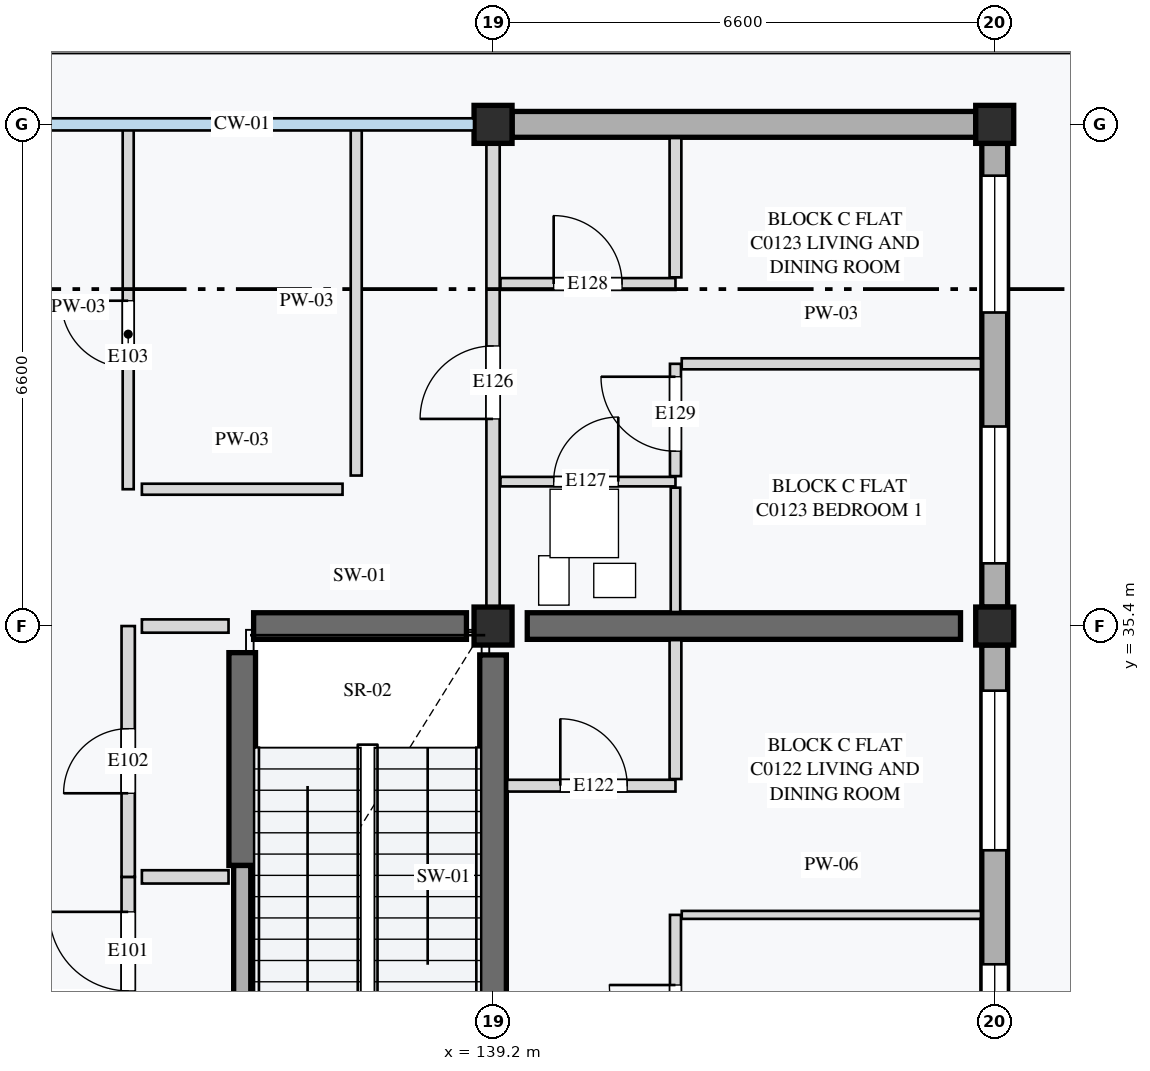
"""IFC4 building model, lengths in metres.
Left out: names, types, materials, properties, quantities, classifications, styles, units other than length and angle.
Written with IfcOpenShell. Run it as: python <this file> out.ifc"""

import sys

from ifc_helpers import new_model, si_unit, direction, frame, frame_2d, origin, origin_2d, place, context, subcontext, project, spatial, rectangle, extrude, element, fill, save


model = new_model("IFC4")
c1 = context("Model", 3, precision=1e-05, world=origin(), true_north=direction((0.0, 1.0)))
c2 = subcontext(c1, "Body", "Model", "MODEL_VIEW")
j1 = project(units=[si_unit("LENGTHUNIT", "METRE"), si_unit("PLANEANGLEUNIT", "RADIAN")], contexts=[c1])
p1 = place(None, origin())
s1 = spatial("IfcSite", under=j1, at=p1, CompositionType="ELEMENT")
p2 = place(p1, origin())
s2 = spatial("IfcBuilding", under=s1, at=p2, CompositionType="ELEMENT")
p3 = place(p2, frame((0.0, 0.0, 4.2)))
s3 = spatial("IfcBuildingStorey", under=s2, at=p3, CompositionType="ELEMENT", Elevation=4.2)
for number, where, z_axis, x_axis in (
    (1, (139.2, 35.4, 0.0), (0.0, 0.0, 1.0), (1.0, 0.0, 0.0)),
    (2, (145.8, 35.4, 0.0), (0.0, 0.0, 1.0), (1.0, 0.0, 0.0)),
    (3, (139.2, 42.0, 0.0), (0.0, 0.0, 1.0), (1.0, 0.0, 0.0)),
    (4, (145.8, 42.0, 0.0), (0.0, 0.0, 1.0), (1.0, 0.0, 0.0)),
):
    element("IfcColumn", number, at=place(p3, frame(where, z_axis=z_axis, x_axis=x_axis)), inside=s3, PredefinedType="COLUMN", context=c2, shape_type="SweptSolid", body=[
        extrude(rectangle(XDim=0.5, YDim=0.5, at=origin_2d()), origin(), (0.0, 0.0, 1.0), 4.2),
    ])
p4 = place(p3, frame((139.2, 29.18, 0.0), z_axis=(0.0, 0.0, 1.0), x_axis=(0.0, 1.0, 0.0)))
e5 = element("IfcWall", 5, at=p4, inside=s3, PredefinedType="SHEAR", context=c2, shape_type="SweptSolid", body=[
    extrude(rectangle(XDim=5.84, YDim=0.35, at=frame_2d((2.92, 0.0))), origin(), (0.0, 0.0, 1.0), 3.96),
])
for number, where, z_axis, x_axis in (
    (6, (135.9, 32.25, 0.0), (0.0, 0.0, 1.0), (0.0, 1.0, 0.0)),
    (7, (136.05, 35.4, 0.0), (0.0, 0.0, 1.0), (1.0, 0.0, 0.0)),
):
    element("IfcWall", number, at=place(p3, frame(where, z_axis=z_axis, x_axis=x_axis)), inside=s3, PredefinedType="SHEAR", context=c2, shape_type="SweptSolid", body=[
        extrude(rectangle(XDim=2.8, YDim=0.35, at=frame_2d((1.4, 0.0))), origin(), (0.0, 0.0, 1.0), 3.96),
    ])
p5 = place(p3, frame((139.65, 35.4, 0.0), z_axis=(0.0, 0.0, 1.0), x_axis=(1.0, 0.0, 0.0)))
e8 = element("IfcWall", 8, at=p5, inside=s3, PredefinedType="SHEAR", context=c2, shape_type="SweptSolid", body=[
    extrude(rectangle(XDim=5.7, YDim=0.35, at=frame_2d((2.85, 0.0))), origin(), (0.0, 0.0, 1.0), 3.96),
])
p6 = place(p3, frame((145.8, 29.05, 0.0), z_axis=(0.0, 0.0, 1.0), x_axis=(0.0, 1.0, 0.0)))
e9 = element("IfcWall", 9, at=p6, inside=s3, PredefinedType="STANDARD", context=c2, shape_type="SweptSolid", body=[
    extrude(rectangle(XDim=6.1, YDim=0.34, at=frame_2d((3.05, 0.0))), origin(), (0.0, 0.0, 1.0), 3.6),
])
p7 = place(p6, frame((0.7, 0.0, 0.85)))
e10 = element("IfcOpeningElement", 10, at=p7, cuts=e9, PredefinedType="OPENING", context=c2, shape_type="SweptSolid", body=[
    extrude(rectangle(XDim=1.2, YDim=1.35, at=frame_2d((0.6, 0.675))), frame((0.0, 0.18, 0.0), z_axis=(0.0, -1.0, 0.0), x_axis=(1.0, 0.0, 0.0)), (0.0, 0.0, 1.0), 0.36),
])
p8 = place(p6, frame((3.4, 0.0, 0.85)))
e11 = element("IfcOpeningElement", 11, at=p8, cuts=e9, PredefinedType="OPENING", context=c2, shape_type="SweptSolid", body=[
    extrude(rectangle(XDim=2.1, YDim=1.55, at=frame_2d((1.05, 0.775))), frame((0.0, 0.18, 0.0), z_axis=(0.0, -1.0, 0.0), x_axis=(1.0, 0.0, 0.0)), (0.0, 0.0, 1.0), 0.36),
])
p9 = place(p3, frame((145.8, 35.65, 0.0), z_axis=(0.0, 0.0, 1.0), x_axis=(0.0, 1.0, 0.0)))
e12 = element("IfcWall", 12, at=p9, inside=s3, PredefinedType="STANDARD", context=c2, shape_type="SweptSolid", body=[
    extrude(rectangle(XDim=6.1, YDim=0.34, at=frame_2d((3.05, 0.0))), origin(), (0.0, 0.0, 1.0), 3.6),
])
p10 = place(p9, frame((0.575, 0.0, 0.85)))
e13 = element("IfcOpeningElement", 13, at=p10, cuts=e12, PredefinedType="OPENING", context=c2, shape_type="SweptSolid", body=[
    extrude(rectangle(XDim=1.8, YDim=1.35, at=frame_2d((0.9, 0.675))), frame((0.0, 0.18, 0.0), z_axis=(0.0, -1.0, 0.0), x_axis=(1.0, 0.0, 0.0)), (0.0, 0.0, 1.0), 0.36),
])
p11 = place(p9, frame((3.875, 0.0, 0.85)))
e14 = element("IfcOpeningElement", 14, at=p11, cuts=e12, PredefinedType="OPENING", context=c2, shape_type="SweptSolid", body=[
    extrude(rectangle(XDim=1.8, YDim=1.55, at=frame_2d((0.9, 0.775))), frame((0.0, 0.18, 0.0), z_axis=(0.0, -1.0, 0.0), x_axis=(1.0, 0.0, 0.0)), (0.0, 0.0, 1.0), 0.36),
])
p12 = place(p3, frame((139.45, 42.0, 0.0), z_axis=(0.0, 0.0, 1.0), x_axis=(1.0, 0.0, 0.0)))
e15 = element("IfcWall", 15, at=p12, inside=s3, PredefinedType="STANDARD", context=c2, shape_type="SweptSolid", body=[
    extrude(rectangle(XDim=6.1, YDim=0.34, at=frame_2d((3.05, 0.0))), origin(), (0.0, 0.0, 1.0), 3.65),
])
p13 = place(p3, frame((135.9, 28.8, 0.0), z_axis=(0.0, 0.0, 1.0), x_axis=(0.0, 1.0, 0.0)))
e16 = element("IfcWall", 16, at=p13, inside=s3, PredefinedType="STANDARD", context=c2, shape_type="SweptSolid", body=[
    extrude(rectangle(XDim=3.45, YDim=0.225, at=frame_2d((1.725, 0.0))), origin(), (0.0, 0.0, 1.0), 3.96),
])
p14 = place(p13, frame((0.45, 0.0, 0.0)))
e17 = element("IfcOpeningElement", 17, at=p14, cuts=e16, PredefinedType="OPENING", context=c2, shape_type="SweptSolid", body=[
    extrude(rectangle(XDim=1.0, YDim=2.16, at=frame_2d((0.5, 1.08))), frame((0.0, 0.123, 0.0), z_axis=(0.0, -1.0, 0.0), x_axis=(1.0, 0.0, 0.0)), (0.0, 0.0, 1.0), 0.245),
])
p15 = place(p3, frame((134.4, 28.8, 0.0), z_axis=(0.0, 0.0, 1.0), x_axis=(0.0, 1.0, 0.0)))
e18 = element("IfcWall", 18, at=p15, inside=s3, PredefinedType="PARTITIONING", context=c2, shape_type="SweptSolid", body=[
    extrude(rectangle(XDim=3.3, YDim=0.175, at=frame_2d((1.65, 0.0))), origin(), (0.0, 0.0, 1.0), 3.96),
])
p16 = place(p15, frame((1.8, 0.0, 0.0)))
e19 = element("IfcOpeningElement", 19, at=p16, cuts=e18, PredefinedType="OPENING", context=c2, shape_type="SweptSolid", body=[
    extrude(rectangle(XDim=1.04, YDim=2.12, at=frame_2d((0.52, 1.06))), frame((0.0, 0.097, 0.0), z_axis=(0.0, -1.0, 0.0), x_axis=(1.0, 0.0, 0.0)), (0.0, 0.0, 1.0), 0.195),
])
p17 = place(p3, frame((134.4, 32.1, 0.0), z_axis=(0.0, 0.0, 1.0), x_axis=(0.0, 1.0, 0.0)))
e20 = element("IfcWall", 20, at=p17, inside=s3, PredefinedType="PARTITIONING", context=c2, shape_type="SweptSolid", body=[
    extrude(rectangle(XDim=3.3, YDim=0.175, at=frame_2d((1.65, 0.0))), origin(), (0.0, 0.0, 1.0), 3.96),
])
p18 = place(p17, frame((1.1, 0.0, 0.0)))
e21 = element("IfcOpeningElement", 21, at=p18, cuts=e20, PredefinedType="OPENING", context=c2, shape_type="SweptSolid", body=[
    extrude(rectangle(XDim=0.85, YDim=2.0, at=frame_2d((0.425, 1.0))), frame((0.0, 0.097, 0.0), z_axis=(0.0, -1.0, 0.0), x_axis=(1.0, 0.0, 0.0)), (0.0, 0.0, 1.0), 0.195),
])
for number, where, z_axis, x_axis in (
    (22, (134.58, 32.1, 0.0), (0.0, 0.0, 1.0), (1.0, 0.0, 0.0)),
    (23, (134.58, 35.4, 0.0), (0.0, 0.0, 1.0), (1.0, 0.0, 0.0)),
):
    element("IfcWall", number, at=place(p3, frame(where, z_axis=z_axis, x_axis=x_axis)), inside=s3, PredefinedType="PARTITIONING", context=c2, shape_type="SweptSolid", body=[
        extrude(rectangle(XDim=1.14, YDim=0.175, at=frame_2d((0.57, 0.0))), origin(), (0.0, 0.0, 1.0), 3.96),
    ])
p19 = place(p3, frame((134.4, 37.2, 0.0), z_axis=(0.0, 0.0, 1.0), x_axis=(0.0, 1.0, 0.0)))
e24 = element("IfcWall", 24, at=p19, inside=s3, PredefinedType="PARTITIONING", context=c2, shape_type="SweptSolid", body=[
    extrude(rectangle(XDim=4.8, YDim=0.145, at=frame_2d((2.4, 0.0))), origin(), (0.0, 0.0, 1.0), 3.96),
])
p20 = place(p19, frame((1.6, 0.0, 0.0)))
e25 = element("IfcOpeningElement", 25, at=p20, cuts=e24, PredefinedType="OPENING", context=c2, shape_type="SweptSolid", body=[
    extrude(rectangle(XDim=0.88, YDim=2.1, at=frame_2d((0.44, 1.05))), frame((0.0, 0.083, 0.0), z_axis=(0.0, -1.0, 0.0), x_axis=(1.0, 0.0, 0.0)), (0.0, 0.0, 1.0), 0.165),
])
p21 = place(p3, frame((137.4, 37.38, 0.0), z_axis=(0.0, 0.0, 1.0), x_axis=(0.0, 1.0, 0.0)))
e26 = element("IfcWall", 26, at=p21, inside=s3, PredefinedType="PARTITIONING", context=c2, shape_type="SweptSolid", body=[
    extrude(rectangle(XDim=4.6, YDim=0.145, at=frame_2d((2.3, 0.0))), origin(), (0.0, 0.0, 1.0), 3.96),
])
p22 = place(p3, frame((134.58, 37.2, 0.0), z_axis=(0.0, 0.0, 1.0), x_axis=(1.0, 0.0, 0.0)))
e27 = element("IfcWall", 27, at=p22, inside=s3, PredefinedType="PARTITIONING", context=c2, shape_type="SweptSolid", body=[
    extrude(rectangle(XDim=2.64, YDim=0.145, at=frame_2d((1.32, 0.0))), origin(), (0.0, 0.0, 1.0), 3.96),
])
p23 = place(p3, frame((139.385, 33.3, 0.0), z_axis=(0.0, 0.0, 1.0), x_axis=(1.0, 0.0, 0.0)))
e28 = element("IfcWall", 28, at=p23, inside=s3, PredefinedType="PARTITIONING", context=c2, shape_type="SweptSolid", body=[
    extrude(rectangle(XDim=2.215, YDim=0.155, at=frame_2d((1.107, 0.0))), origin(), (0.0, 0.0, 1.0), 3.96),
])
p24 = place(p23, frame((0.7, 0.0, 0.0)))
e29 = element("IfcOpeningElement", 29, at=p24, cuts=e28, PredefinedType="OPENING", context=c2, shape_type="SweptSolid", body=[
    extrude(rectangle(XDim=0.88, YDim=2.16, at=frame_2d((0.44, 1.08))), frame((0.0, 0.087, 0.0), z_axis=(0.0, -1.0, 0.0), x_axis=(1.0, 0.0, 0.0)), (0.0, 0.0, 1.0), 0.175),
])
p25 = place(p3, frame((141.6, 33.387, 0.0), z_axis=(0.0, 0.0, 1.0), x_axis=(0.0, 1.0, 0.0)))
e30 = element("IfcWall", 30, at=p25, inside=s3, PredefinedType="PARTITIONING", context=c2, shape_type="SweptSolid", body=[
    extrude(rectangle(XDim=1.828, YDim=0.155, at=frame_2d((0.914, 0.0))), origin(), (0.0, 0.0, 1.0), 3.96),
])
p26 = place(p3, frame((141.6, 28.782, 0.0), z_axis=(0.0, 0.0, 1.0), x_axis=(0.0, 1.0, 0.0)))
e31 = element("IfcWall", 31, at=p26, inside=s3, PredefinedType="PARTITIONING", context=c2, shape_type="SweptSolid", body=[
    extrude(rectangle(XDim=2.818, YDim=0.145, at=frame_2d((1.409, 0.0))), origin(), (0.0, 0.0, 1.0), 3.96),
])
p27 = place(p26, frame((1.025, 0.0, 0.0)))
e32 = element("IfcOpeningElement", 32, at=p27, cuts=e31, PredefinedType="OPENING", context=c2, shape_type="SweptSolid", body=[
    extrude(rectangle(XDim=0.87, YDim=2.08, at=frame_2d((0.435, 1.04))), frame((0.0, 0.083, 0.0), z_axis=(0.0, -1.0, 0.0), x_axis=(1.0, 0.0, 0.0)), (0.0, 0.0, 1.0), 0.165),
])
p28 = place(p3, frame((141.683, 31.6, 0.0), z_axis=(0.0, 0.0, 1.0), x_axis=(1.0, 0.0, 0.0)))
e33 = element("IfcWall", 33, at=p28, inside=s3, PredefinedType="PARTITIONING", context=c2, shape_type="SweptSolid", body=[
    extrude(rectangle(XDim=3.938, YDim=0.105, at=frame_2d((1.969, 0.0))), origin(), (0.0, 0.0, 1.0), 3.96),
])
p29 = place(p3, frame((139.2, 35.4, 0.0), z_axis=(0.0, 0.0, 1.0), x_axis=(0.0, 1.0, 0.0)))
e34 = element("IfcWall", 34, at=p29, inside=s3, PredefinedType="PARTITIONING", context=c2, shape_type="SweptSolid", body=[
    extrude(rectangle(XDim=6.6, YDim=0.175, at=frame_2d((3.3, 0.0))), origin(), (0.0, 0.0, 1.0), 3.7),
])
p30 = place(p29, frame((2.725, 0.0, 0.0)))
e35 = element("IfcOpeningElement", 35, at=p30, cuts=e34, PredefinedType="OPENING", context=c2, shape_type="SweptSolid", body=[
    extrude(rectangle(XDim=0.96, YDim=2.18, at=frame_2d((0.48, 1.09))), frame((0.0, 0.097, 0.0), z_axis=(0.0, -1.0, 0.0), x_axis=(1.0, 0.0, 0.0)), (0.0, 0.0, 1.0), 0.195),
])
p31 = place(p3, frame((139.298, 37.3, 0.0), z_axis=(0.0, 0.0, 1.0), x_axis=(1.0, 0.0, 0.0)))
e36 = element("IfcWall", 36, at=p31, inside=s3, PredefinedType="PARTITIONING", context=c2, shape_type="SweptSolid", body=[
    extrude(rectangle(XDim=2.302, YDim=0.125, at=frame_2d((1.151, 0.0))), origin(), (0.0, 0.0, 1.0), 3.96),
])
p32 = place(p31, frame((0.7, 0.0, 0.0)))
e37 = element("IfcOpeningElement", 37, at=p32, cuts=e36, PredefinedType="OPENING", context=c2, shape_type="SweptSolid", body=[
    extrude(rectangle(XDim=0.85, YDim=2.04, at=frame_2d((0.425, 1.02))), frame((0.0, 0.073, 0.0), z_axis=(0.0, -1.0, 0.0), x_axis=(1.0, 0.0, 0.0)), (0.0, 0.0, 1.0), 0.145),
])
p33 = place(p3, frame((141.6, 35.585, 0.0), z_axis=(0.0, 0.0, 1.0), x_axis=(0.0, 1.0, 0.0)))
e38 = element("IfcWall", 38, at=p33, inside=s3, PredefinedType="PARTITIONING", context=c2, shape_type="SweptSolid", body=[
    extrude(rectangle(XDim=1.635, YDim=0.125, at=frame_2d((0.817, 0.0))), origin(), (0.0, 0.0, 1.0), 3.96),
])
p34 = place(p3, frame((139.298, 39.9, 0.0), z_axis=(0.0, 0.0, 1.0), x_axis=(1.0, 0.0, 0.0)))
e39 = element("IfcWall", 39, at=p34, inside=s3, PredefinedType="PARTITIONING", context=c2, shape_type="SweptSolid", body=[
    extrude(rectangle(XDim=2.302, YDim=0.155, at=frame_2d((1.151, 0.0))), origin(), (0.0, 0.0, 1.0), 3.96),
])
p35 = place(p34, frame((0.7, 0.0, 0.0)))
e40 = element("IfcOpeningElement", 40, at=p35, cuts=e39, PredefinedType="OPENING", context=c2, shape_type="SweptSolid", body=[
    extrude(rectangle(XDim=0.9, YDim=2.16, at=frame_2d((0.45, 1.08))), frame((0.0, 0.087, 0.0), z_axis=(0.0, -1.0, 0.0), x_axis=(1.0, 0.0, 0.0)), (0.0, 0.0, 1.0), 0.175),
])
p36 = place(p3, frame((141.6, 39.988, 0.0), z_axis=(0.0, 0.0, 1.0), x_axis=(0.0, 1.0, 0.0)))
e41 = element("IfcWall", 41, at=p36, inside=s3, PredefinedType="PARTITIONING", context=c2, shape_type="SweptSolid", body=[
    extrude(rectangle(XDim=1.833, YDim=0.155, at=frame_2d((0.916, 0.0))), origin(), (0.0, 0.0, 1.0), 3.96),
])
p37 = place(p3, frame((141.6, 37.373, 0.0), z_axis=(0.0, 0.0, 1.0), x_axis=(0.0, 1.0, 0.0)))
e42 = element("IfcWall", 42, at=p37, inside=s3, PredefinedType="PARTITIONING", context=c2, shape_type="SweptSolid", body=[
    extrude(rectangle(XDim=1.478, YDim=0.145, at=frame_2d((0.739, 0.0))), origin(), (0.0, 0.0, 1.0), 3.96),
])
p38 = place(p37, frame((0.327, 0.0, 0.0)))
e43 = element("IfcOpeningElement", 43, at=p38, cuts=e42, PredefinedType="OPENING", context=c2, shape_type="SweptSolid", body=[
    extrude(rectangle(XDim=0.98, YDim=2.12, at=frame_2d((0.49, 1.06))), frame((0.0, 0.083, 0.0), z_axis=(0.0, -1.0, 0.0), x_axis=(1.0, 0.0, 0.0)), (0.0, 0.0, 1.0), 0.165),
])
p39 = place(p3, frame((141.683, 38.85, 0.0), z_axis=(0.0, 0.0, 1.0), x_axis=(1.0, 0.0, 0.0)))
e44 = element("IfcWall", 44, at=p39, inside=s3, PredefinedType="PARTITIONING", context=c2, shape_type="SweptSolid", body=[
    extrude(rectangle(XDim=3.938, YDim=0.145, at=frame_2d((1.969, 0.0))), origin(), (0.0, 0.0, 1.0), 3.96),
])
p40 = place(p7, origin())
e45 = element("IfcWindow", 45, at=p40, inside=s3, PartitioningType="SINGLE_PANEL", PredefinedType="WINDOW", context=c2, shape_type="SweptSolid", body=[
    extrude(rectangle(XDim=1.2, YDim=1.35, at=frame_2d((0.6, 0.675))), frame((0.0, 0.03, 0.0), z_axis=(0.0, -1.0, 0.0), x_axis=(1.0, 0.0, 0.0)), (0.0, 0.0, 1.0), 0.06),
])
fill(e10, e45)
p41 = place(p8, origin())
e46 = element("IfcWindow", 46, at=p41, inside=s3, PartitioningType="SINGLE_PANEL", PredefinedType="WINDOW", context=c2, shape_type="SweptSolid", body=[
    extrude(rectangle(XDim=2.1, YDim=1.55, at=frame_2d((1.05, 0.775))), frame((0.0, 0.03, 0.0), z_axis=(0.0, -1.0, 0.0), x_axis=(1.0, 0.0, 0.0)), (0.0, 0.0, 1.0), 0.06),
])
fill(e11, e46)
p42 = place(p10, origin())
e47 = element("IfcWindow", 47, at=p42, inside=s3, PartitioningType="SINGLE_PANEL", PredefinedType="WINDOW", context=c2, shape_type="SweptSolid", body=[
    extrude(rectangle(XDim=1.8, YDim=1.35, at=frame_2d((0.9, 0.675))), frame((0.0, 0.03, 0.0), z_axis=(0.0, -1.0, 0.0), x_axis=(1.0, 0.0, 0.0)), (0.0, 0.0, 1.0), 0.06),
])
fill(e13, e47)
p43 = place(p11, origin())
e48 = element("IfcWindow", 48, at=p43, inside=s3, PartitioningType="SINGLE_PANEL", PredefinedType="WINDOW", context=c2, shape_type="SweptSolid", body=[
    extrude(rectangle(XDim=1.8, YDim=1.55, at=frame_2d((0.9, 0.775))), frame((0.0, 0.03, 0.0), z_axis=(0.0, -1.0, 0.0), x_axis=(1.0, 0.0, 0.0)), (0.0, 0.0, 1.0), 0.06),
])
fill(e14, e48)
p44 = place(p16, origin())
e49 = element("IfcDoor", 49, at=p44, inside=s3, OperationType="SINGLE_SWING_RIGHT", PredefinedType="DOOR", context=c2, shape_type="SweptSolid", body=[
    extrude(rectangle(XDim=1.04, YDim=2.12, at=frame_2d((0.52, 1.06))), frame((0.0, 0.025, 0.0), z_axis=(0.0, -1.0, 0.0), x_axis=(1.0, 0.0, 0.0)), (0.0, 0.0, 1.0), 0.05),
])
fill(e19, e49)
p45 = place(p18, origin())
e50 = element("IfcDoor", 50, at=p45, inside=s3, OperationType="SINGLE_SWING_LEFT", PredefinedType="DOOR", context=c2, shape_type="SweptSolid", body=[
    extrude(rectangle(XDim=0.85, YDim=2.0, at=frame_2d((0.425, 1.0))), frame((0.0, 0.025, 0.0), z_axis=(0.0, -1.0, 0.0), x_axis=(1.0, 0.0, 0.0)), (0.0, 0.0, 1.0), 0.05),
])
fill(e21, e50)
p46 = place(p20, origin())
e51 = element("IfcDoor", 51, at=p46, inside=s3, OperationType="SINGLE_SWING_RIGHT", PredefinedType="DOOR", context=c2, shape_type="SweptSolid", body=[
    extrude(rectangle(XDim=0.88, YDim=2.1, at=frame_2d((0.44, 1.05))), frame((0.0, 0.025, 0.0), z_axis=(0.0, -1.0, 0.0), x_axis=(1.0, 0.0, 0.0)), (0.0, 0.0, 1.0), 0.05),
])
fill(e25, e51)
p47 = place(p24, origin())
e52 = element("IfcDoor", 52, at=p47, inside=s3, OperationType="SINGLE_SWING_LEFT", PredefinedType="DOOR", context=c2, shape_type="SweptSolid", body=[
    extrude(rectangle(XDim=0.88, YDim=2.16, at=frame_2d((0.44, 1.08))), frame((0.0, 0.025, 0.0), z_axis=(0.0, -1.0, 0.0), x_axis=(1.0, 0.0, 0.0)), (0.0, 0.0, 1.0), 0.05),
])
fill(e29, e52)
p48 = place(p27, origin())
e53 = element("IfcDoor", 53, at=p48, inside=s3, OperationType="SINGLE_SWING_RIGHT", PredefinedType="DOOR", context=c2, shape_type="SweptSolid", body=[
    extrude(rectangle(XDim=0.87, YDim=2.08, at=frame_2d((0.435, 1.04))), frame((0.0, 0.025, 0.0), z_axis=(0.0, -1.0, 0.0), x_axis=(1.0, 0.0, 0.0)), (0.0, 0.0, 1.0), 0.05),
])
fill(e32, e53)
p49 = place(p30, origin())
e54 = element("IfcDoor", 54, at=p49, inside=s3, OperationType="SINGLE_SWING_LEFT", PredefinedType="DOOR", context=c2, shape_type="SweptSolid", body=[
    extrude(rectangle(XDim=0.96, YDim=2.18, at=frame_2d((0.48, 1.09))), frame((0.0, 0.025, 0.0), z_axis=(0.0, -1.0, 0.0), x_axis=(1.0, 0.0, 0.0)), (0.0, 0.0, 1.0), 0.05),
])
fill(e35, e54)
p50 = place(p32, origin())
e55 = element("IfcDoor", 55, at=p50, inside=s3, OperationType="SINGLE_SWING_RIGHT", PredefinedType="DOOR", context=c2, shape_type="SweptSolid", body=[
    extrude(rectangle(XDim=0.85, YDim=2.04, at=frame_2d((0.425, 1.02))), frame((0.0, 0.025, 0.0), z_axis=(0.0, -1.0, 0.0), x_axis=(1.0, 0.0, 0.0)), (0.0, 0.0, 1.0), 0.05),
])
fill(e37, e55)
p51 = place(p35, origin())
e56 = element("IfcDoor", 56, at=p51, inside=s3, OperationType="SINGLE_SWING_LEFT", PredefinedType="DOOR", context=c2, shape_type="SweptSolid", body=[
    extrude(rectangle(XDim=0.9, YDim=2.16, at=frame_2d((0.45, 1.08))), frame((0.0, 0.025, 0.0), z_axis=(0.0, -1.0, 0.0), x_axis=(1.0, 0.0, 0.0)), (0.0, 0.0, 1.0), 0.05),
])
fill(e40, e56)
p52 = place(p38, origin())
e57 = element("IfcDoor", 57, at=p52, inside=s3, OperationType="SINGLE_SWING_RIGHT", PredefinedType="DOOR", context=c2, shape_type="SweptSolid", body=[
    extrude(rectangle(XDim=0.98, YDim=2.12, at=frame_2d((0.49, 1.06))), frame((0.0, 0.025, 0.0), z_axis=(0.0, -1.0, 0.0), x_axis=(1.0, 0.0, 0.0)), (0.0, 0.0, 1.0), 0.05),
])
fill(e43, e57)
save(model, sys.argv[1])
